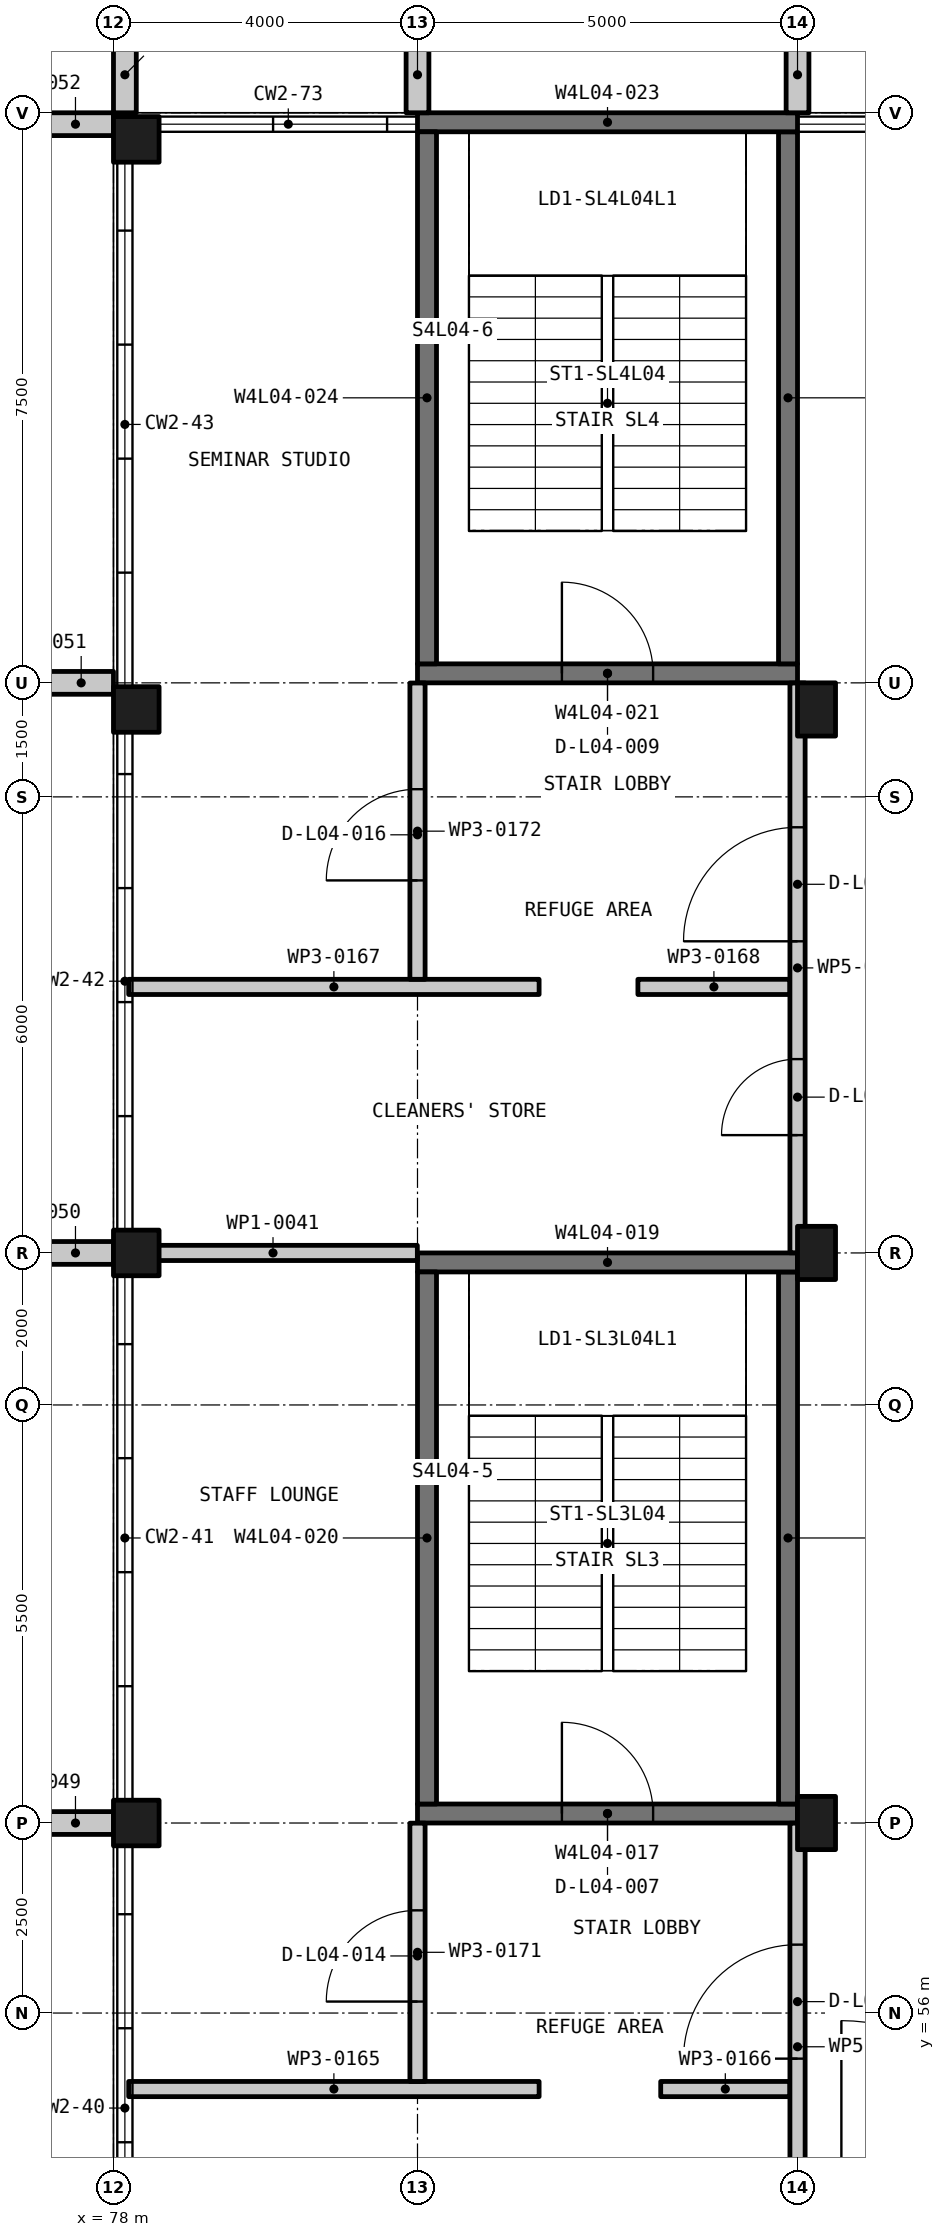
"""IFC4 building model, lengths in metres.
Left out: names, types, materials, properties, quantities, classifications, styles, units other than length and angle.
Written with IfcOpenShell. Run it as: python <this file> out.ifc"""

import sys

from ifc_helpers import new_model, si_unit, direction, frame, frame_2d, origin, origin_2d, place, context, subcontext, project, spatial, rectangle, extrude, element, fill, save


model = new_model("IFC4")
c1 = context("Model", 3, precision=1e-05, world=origin(), true_north=direction((0.0, 1.0)))
c2 = subcontext(c1, "Body", "Model", "MODEL_VIEW")
j1 = project(units=[si_unit("LENGTHUNIT", "METRE"), si_unit("PLANEANGLEUNIT", "RADIAN")], contexts=[c1])
p1 = place(None, origin())
s1 = spatial("IfcSite", under=j1, at=p1, CompositionType="ELEMENT")
p2 = place(p1, origin())
s2 = spatial("IfcBuilding", under=s1, at=p2, CompositionType="ELEMENT")
p3 = place(p2, frame((0.0, 0.0, 20.25)))
s3 = spatial("IfcBuildingStorey", under=s2, at=p3, CompositionType="ELEMENT", Elevation=20.25)
for number, where, z_axis, x_axis in (
    (1, (78.3, 58.5, -0.3), (0.0, 0.0, 1.0), (1.0, 0.0, 0.0)),
    (2, (78.3, 66.0, -0.3), (0.0, 0.0, 1.0), (1.0, 0.0, 0.0)),
    (3, (78.3, 73.15, -0.3), (0.0, 0.0, 1.0), (1.0, 0.0, 0.0)),
    (4, (78.3, 80.65, -0.3), (0.0, 0.0, 1.0), (1.0, 0.0, 0.0)),
):
    element("IfcColumn", number, at=place(p3, frame(where, z_axis=z_axis, x_axis=x_axis)), inside=s3, PredefinedType="COLUMN", context=c2, shape_type="SweptSolid", body=[
        extrude(rectangle(XDim=0.6, YDim=0.6, at=origin_2d()), origin(), (0.0, 0.0, 1.0), 4.5),
    ])
for number, where, z_axis, x_axis in (
    (5, (87.25, 58.5, -0.3), (0.0, 0.0, 1.0), (1.0, 0.0, 0.0)),
    (6, (87.25, 66.0, -0.3), (0.0, 0.0, 1.0), (1.0, 0.0, 0.0)),
    (7, (87.25, 73.15, -0.3), (0.0, 0.0, 1.0), (1.0, 0.0, 0.0)),
):
    element("IfcColumn", number, at=place(p3, frame(where, z_axis=z_axis, x_axis=x_axis)), inside=s3, PredefinedType="COLUMN", context=c2, shape_type="SweptSolid", body=[
        extrude(rectangle(XDim=0.5, YDim=0.7, at=origin_2d()), origin(), (0.0, 0.0, 1.0), 4.5),
    ])
p4 = place(p3, frame((82.0, 58.625, -0.3), z_axis=(0.0, 0.0, 1.0), x_axis=(1.0, 0.0, 0.0)))
e8 = element("IfcWall", 8, at=p4, inside=s3, PredefinedType="SHEAR", context=c2, shape_type="SweptSolid", body=[
    extrude(rectangle(XDim=5.0, YDim=0.25, at=frame_2d((2.5, 0.0))), origin(), (0.0, 0.0, 1.0), 4.5),
])
p5 = place(p4, frame((1.9, 0.0, 0.3)))
e9 = element("IfcOpeningElement", 9, at=p5, cuts=e8, PredefinedType="OPENING", context=c2, shape_type="SweptSolid", body=[
    extrude(rectangle(XDim=1.2, YDim=2.2, at=frame_2d((0.6, 1.1))), frame((0.0, 0.135, 0.0), z_axis=(0.0, -1.0, 0.0), x_axis=(1.0, 0.0, 0.0)), (0.0, 0.0, 1.0), 0.27),
])
p6 = place(p3, frame((86.875, 58.75, -0.3), z_axis=(0.0, 0.0, 1.0), x_axis=(0.0, 1.0, 0.0)))
e10 = element("IfcWall", 10, at=p6, inside=s3, PredefinedType="SHEAR", context=c2, shape_type="SweptSolid", body=[
    extrude(rectangle(XDim=7.0, YDim=0.25, at=frame_2d((3.5, 0.0))), origin(), (0.0, 0.0, 1.0), 4.5),
])
p7 = place(p3, frame((82.0, 65.875, -0.3), z_axis=(0.0, 0.0, 1.0), x_axis=(1.0, 0.0, 0.0)))
e11 = element("IfcWall", 11, at=p7, inside=s3, PredefinedType="SHEAR", context=c2, shape_type="SweptSolid", body=[
    extrude(rectangle(XDim=5.0, YDim=0.25, at=frame_2d((2.5, 0.0))), origin(), (0.0, 0.0, 1.0), 4.5),
])
p8 = place(p3, frame((82.125, 58.75, -0.3), z_axis=(0.0, 0.0, 1.0), x_axis=(0.0, 1.0, 0.0)))
e12 = element("IfcWall", 12, at=p8, inside=s3, PredefinedType="SHEAR", context=c2, shape_type="SweptSolid", body=[
    extrude(rectangle(XDim=7.0, YDim=0.25, at=frame_2d((3.5, 0.0))), origin(), (0.0, 0.0, 1.0), 4.5),
])
p9 = place(p3, frame((82.0, 73.625, -0.3), z_axis=(0.0, 0.0, 1.0), x_axis=(1.0, 0.0, 0.0)))
e13 = element("IfcWall", 13, at=p9, inside=s3, PredefinedType="SHEAR", context=c2, shape_type="SweptSolid", body=[
    extrude(rectangle(XDim=5.0, YDim=0.25, at=frame_2d((2.5, 0.0))), origin(), (0.0, 0.0, 1.0), 4.5),
])
p10 = place(p9, frame((1.9, 0.0, 0.3)))
e14 = element("IfcOpeningElement", 14, at=p10, cuts=e13, PredefinedType="OPENING", context=c2, shape_type="SweptSolid", body=[
    extrude(rectangle(XDim=1.2, YDim=2.2, at=frame_2d((0.6, 1.1))), frame((0.0, 0.135, 0.0), z_axis=(0.0, -1.0, 0.0), x_axis=(1.0, 0.0, 0.0)), (0.0, 0.0, 1.0), 0.27),
])
p11 = place(p3, frame((86.875, 73.75, -0.3), z_axis=(0.0, 0.0, 1.0), x_axis=(0.0, 1.0, 0.0)))
e15 = element("IfcWall", 15, at=p11, inside=s3, PredefinedType="SHEAR", context=c2, shape_type="SweptSolid", body=[
    extrude(rectangle(XDim=7.0, YDim=0.25, at=frame_2d((3.5, 0.0))), origin(), (0.0, 0.0, 1.0), 4.5),
])
p12 = place(p3, frame((82.0, 80.875, -0.3), z_axis=(0.0, 0.0, 1.0), x_axis=(1.0, 0.0, 0.0)))
e16 = element("IfcWall", 16, at=p12, inside=s3, PredefinedType="SHEAR", context=c2, shape_type="SweptSolid", body=[
    extrude(rectangle(XDim=5.0, YDim=0.25, at=frame_2d((2.5, 0.0))), origin(), (0.0, 0.0, 1.0), 4.5),
])
p13 = place(p3, frame((82.125, 73.75, -0.3), z_axis=(0.0, 0.0, 1.0), x_axis=(0.0, 1.0, 0.0)))
e17 = element("IfcWall", 17, at=p13, inside=s3, PredefinedType="SHEAR", context=c2, shape_type="SweptSolid", body=[
    extrude(rectangle(XDim=7.0, YDim=0.25, at=frame_2d((3.5, 0.0))), origin(), (0.0, 0.0, 1.0), 4.5),
])
for number, where, z_axis, x_axis in (
    (18, (77.0, 58.5, 0.0), (0.0, 0.0, 1.0), (1.0, 0.0, 0.0)),
    (19, (77.0, 66.0, 0.0), (0.0, 0.0, 1.0), (1.0, 0.0, 0.0)),
):
    element("IfcWall", number, at=place(p3, frame(where, z_axis=z_axis, x_axis=x_axis)), inside=s3, PredefinedType="SOLIDWALL", context=c2, shape_type="SweptSolid", body=[
        extrude(rectangle(XDim=1.0, YDim=0.3, at=frame_2d((0.5, 0.0))), origin(), (0.0, 0.0, 1.0), 4.5),
    ])
p14 = place(p3, frame((77.15, 73.5, 0.0), z_axis=(0.0, 0.0, 1.0), x_axis=(1.0, 0.0, 0.0)))
e20 = element("IfcWall", 20, at=p14, inside=s3, PredefinedType="SOLIDWALL", context=c2, shape_type="SweptSolid", body=[
    extrude(rectangle(XDim=0.85, YDim=0.3, at=frame_2d((0.425, 0.0))), origin(), (0.0, 0.0, 1.0), 4.5),
])
for number, where, z_axis, x_axis in (
    (21, (77.0, 80.85, 0.0), (0.0, 0.0, 1.0), (1.0, 0.0, 0.0)),
    (22, (78.15, 81.0, 0.0), (0.0, 0.0, 1.0), (0.0, 1.0, 0.0)),
    (23, (82.0, 81.0, 0.0), (0.0, 0.0, 1.0), (0.0, 1.0, 0.0)),
    (24, (87.0, 81.0, 0.0), (0.0, 0.0, 1.0), (0.0, 1.0, 0.0)),
):
    element("IfcWall", number, at=place(p3, frame(where, z_axis=z_axis, x_axis=x_axis)), inside=s3, PredefinedType="SOLIDWALL", context=c2, shape_type="SweptSolid", body=[
        extrude(rectangle(XDim=1.0, YDim=0.3, at=frame_2d((0.5, 0.0))), origin(), (0.0, 0.0, 1.0), 4.5),
    ])
p15 = place(p3, frame((78.2, 55.0, 0.0), z_axis=(0.0, 0.0, 1.0), x_axis=(1.0, 0.0, 0.0)))
e25 = element("IfcWall", 25, at=p15, inside=s3, PredefinedType="PARTITIONING", context=c2, shape_type="SweptSolid", body=[
    extrude(rectangle(XDim=5.4, YDim=0.2, at=frame_2d((2.7, 0.0))), origin(), (0.0, 0.0, 1.0), 3.4),
])
p16 = place(p3, frame((85.2, 55.0, 0.0), z_axis=(0.0, 0.0, 1.0), x_axis=(1.0, 0.0, 0.0)))
e26 = element("IfcWall", 26, at=p16, inside=s3, PredefinedType="PARTITIONING", context=c2, shape_type="SweptSolid", body=[
    extrude(rectangle(XDim=1.7, YDim=0.2, at=frame_2d((0.85, 0.0))), origin(), (0.0, 0.0, 1.0), 3.6),
])
p17 = place(p3, frame((78.2, 66.0, 0.0), z_axis=(0.0, 0.0, 1.0), x_axis=(1.0, 0.0, 0.0)))
e27 = element("IfcWall", 27, at=p17, inside=s3, PredefinedType="PARTITIONING", context=c2, shape_type="SweptSolid", body=[
    extrude(rectangle(XDim=3.798, YDim=0.2, at=frame_2d((1.899, 0.0))), origin(), (0.0, 0.0, 1.0), 3.4),
])
p18 = place(p3, frame((78.2, 69.5, 0.0), z_axis=(0.0, 0.0, 1.0), x_axis=(1.0, 0.0, 0.0)))
e28 = element("IfcWall", 28, at=p18, inside=s3, PredefinedType="PARTITIONING", context=c2, shape_type="SweptSolid", body=[
    extrude(rectangle(XDim=5.4, YDim=0.2, at=frame_2d((2.7, 0.0))), origin(), (0.0, 0.0, 1.0), 3.4),
])
p19 = place(p3, frame((84.9, 69.5, 0.0), z_axis=(0.0, 0.0, 1.0), x_axis=(1.0, 0.0, 0.0)))
e29 = element("IfcWall", 29, at=p19, inside=s3, PredefinedType="PARTITIONING", context=c2, shape_type="SweptSolid", body=[
    extrude(rectangle(XDim=2.0, YDim=0.2, at=frame_2d((1.0, 0.0))), origin(), (0.0, 0.0, 1.0), 3.6),
])
p20 = place(p3, frame((87.0, 52.615, 0.0), z_axis=(0.0, 0.0, 1.0), x_axis=(0.0, 1.0, 0.0)))
e30 = element("IfcWall", 30, at=p20, inside=s3, PredefinedType="PARTITIONING", context=c2, shape_type="SweptSolid", body=[
    extrude(rectangle(XDim=5.884, YDim=0.2, at=frame_2d((2.942, 0.0))), origin(), (0.0, 0.0, 1.0), 3.4),
])
p21 = place(p20, frame((2.785, 0.0, 0.0)))
e31 = element("IfcOpeningElement", 31, at=p21, cuts=e30, PredefinedType="OPENING", context=c2, shape_type="SweptSolid", body=[
    extrude(rectangle(XDim=1.5, YDim=2.1, at=frame_2d((0.75, 1.05))), frame((0.0, 0.11, 0.0), z_axis=(0.0, -1.0, 0.0), x_axis=(1.0, 0.0, 0.0)), (0.0, 0.0, 1.0), 0.22),
])
p22 = place(p3, frame((87.0, 66.002, 0.0), z_axis=(0.0, 0.0, 1.0), x_axis=(0.0, 1.0, 0.0)))
e32 = element("IfcWall", 32, at=p22, inside=s3, PredefinedType="PARTITIONING", context=c2, shape_type="SweptSolid", body=[
    extrude(rectangle(XDim=7.496, YDim=0.2, at=frame_2d((3.748, 0.0))), origin(), (0.0, 0.0, 1.0), 3.4),
])
p23 = place(p22, frame((4.098, 0.0, 0.0)))
e33 = element("IfcOpeningElement", 33, at=p23, cuts=e32, PredefinedType="OPENING", context=c2, shape_type="SweptSolid", body=[
    extrude(rectangle(XDim=1.5, YDim=2.1, at=frame_2d((0.75, 1.05))), frame((0.0, 0.11, 0.0), z_axis=(0.0, -1.0, 0.0), x_axis=(1.0, 0.0, 0.0)), (0.0, 0.0, 1.0), 0.22),
])
p24 = place(p22, frame((1.548, 0.0, 0.0)))
e34 = element("IfcOpeningElement", 34, at=p24, cuts=e32, PredefinedType="OPENING", context=c2, shape_type="SweptSolid", body=[
    extrude(rectangle(XDim=1.0, YDim=2.1, at=frame_2d((0.5, 1.05))), frame((0.0, 0.11, 0.0), z_axis=(0.0, -1.0, 0.0), x_axis=(1.0, 0.0, 0.0)), (0.0, 0.0, 1.0), 0.22),
])
p25 = place(p3, frame((82.0, 55.1, 0.0), z_axis=(0.0, 0.0, 1.0), x_axis=(0.0, 1.0, 0.0)))
e35 = element("IfcWall", 35, at=p25, inside=s3, PredefinedType="PARTITIONING", context=c2, shape_type="SweptSolid", body=[
    extrude(rectangle(XDim=3.398, YDim=0.2, at=frame_2d((1.699, 0.0))), origin(), (0.0, 0.0, 1.0), 3.4),
])
p26 = place(p25, frame((1.051, 0.0, 0.0)))
e36 = element("IfcOpeningElement", 36, at=p26, cuts=e35, PredefinedType="OPENING", context=c2, shape_type="SweptSolid", body=[
    extrude(rectangle(XDim=1.2, YDim=2.1, at=frame_2d((0.6, 1.05))), frame((0.0, 0.11, 0.0), z_axis=(0.0, -1.0, 0.0), x_axis=(1.0, 0.0, 0.0)), (0.0, 0.0, 1.0), 0.22),
])
p27 = place(p3, frame((82.0, 69.6, 0.0), z_axis=(0.0, 0.0, 1.0), x_axis=(0.0, 1.0, 0.0)))
e37 = element("IfcWall", 37, at=p27, inside=s3, PredefinedType="PARTITIONING", context=c2, shape_type="SweptSolid", body=[
    extrude(rectangle(XDim=3.898, YDim=0.2, at=frame_2d((1.949, 0.0))), origin(), (0.0, 0.0, 1.0), 3.4),
])
p28 = place(p27, frame((1.301, 0.0, 0.0)))
e38 = element("IfcOpeningElement", 38, at=p28, cuts=e37, PredefinedType="OPENING", context=c2, shape_type="SweptSolid", body=[
    extrude(rectangle(XDim=1.2, YDim=2.1, at=frame_2d((0.6, 1.05))), frame((0.0, 0.11, 0.0), z_axis=(0.0, -1.0, 0.0), x_axis=(1.0, 0.0, 0.0)), (0.0, 0.0, 1.0), 0.22),
])
p29 = place(p5, origin())
e39 = element("IfcDoor", 39, at=p29, inside=s3, OperationType="SINGLE_SWING_LEFT", PredefinedType="DOOR", context=c2, shape_type="SweptSolid", body=[
    extrude(rectangle(XDim=1.2, YDim=2.2, at=frame_2d((0.6, 1.1))), frame((0.0, 0.025, 0.0), z_axis=(0.0, -1.0, 0.0), x_axis=(1.0, 0.0, 0.0)), (0.0, 0.0, 1.0), 0.05),
])
fill(e9, e39)
p30 = place(p21, origin())
e40 = element("IfcDoor", 40, at=p30, inside=s3, OperationType="DOUBLE_DOOR_SINGLE_SWING", PredefinedType="DOOR", context=c2, shape_type="SweptSolid", body=[
    extrude(rectangle(XDim=1.5, YDim=2.1, at=frame_2d((0.75, 1.05))), frame((0.0, 0.025, 0.0), z_axis=(0.0, -1.0, 0.0), x_axis=(1.0, 0.0, 0.0)), (0.0, 0.0, 1.0), 0.05),
])
fill(e31, e40)
p31 = place(p10, origin())
e41 = element("IfcDoor", 41, at=p31, inside=s3, OperationType="SINGLE_SWING_LEFT", PredefinedType="DOOR", context=c2, shape_type="SweptSolid", body=[
    extrude(rectangle(XDim=1.2, YDim=2.2, at=frame_2d((0.6, 1.1))), frame((0.0, 0.025, 0.0), z_axis=(0.0, -1.0, 0.0), x_axis=(1.0, 0.0, 0.0)), (0.0, 0.0, 1.0), 0.05),
])
fill(e14, e41)
p32 = place(p23, origin())
e42 = element("IfcDoor", 42, at=p32, inside=s3, OperationType="DOUBLE_DOOR_SINGLE_SWING", PredefinedType="DOOR", context=c2, shape_type="SweptSolid", body=[
    extrude(rectangle(XDim=1.5, YDim=2.1, at=frame_2d((0.75, 1.05))), frame((0.0, 0.025, 0.0), z_axis=(0.0, -1.0, 0.0), x_axis=(1.0, 0.0, 0.0)), (0.0, 0.0, 1.0), 0.05),
])
fill(e33, e42)
p33 = place(p26, origin())
e43 = element("IfcDoor", 43, at=p33, inside=s3, OperationType="SINGLE_SWING_RIGHT", PredefinedType="DOOR", context=c2, shape_type="SweptSolid", body=[
    extrude(rectangle(XDim=1.2, YDim=2.1, at=frame_2d((0.6, 1.05))), frame((0.0, 0.025, 0.0), z_axis=(0.0, -1.0, 0.0), x_axis=(1.0, 0.0, 0.0)), (0.0, 0.0, 1.0), 0.05),
])
fill(e36, e43)
p34 = place(p24, origin())
e44 = element("IfcDoor", 44, at=p34, inside=s3, OperationType="SINGLE_SWING_RIGHT", PredefinedType="DOOR", context=c2, shape_type="SweptSolid", body=[
    extrude(rectangle(XDim=1.0, YDim=2.1, at=frame_2d((0.5, 1.05))), frame((0.0, 0.025, 0.0), z_axis=(0.0, -1.0, 0.0), x_axis=(1.0, 0.0, 0.0)), (0.0, 0.0, 1.0), 0.05),
])
fill(e34, e44)
p35 = place(p28, origin())
e45 = element("IfcDoor", 45, at=p35, inside=s3, OperationType="SINGLE_SWING_RIGHT", PredefinedType="DOOR", context=c2, shape_type="SweptSolid", body=[
    extrude(rectangle(XDim=1.2, YDim=2.1, at=frame_2d((0.6, 1.05))), frame((0.0, 0.025, 0.0), z_axis=(0.0, -1.0, 0.0), x_axis=(1.0, 0.0, 0.0)), (0.0, 0.0, 1.0), 0.05),
])
fill(e38, e45)
save(model, sys.argv[1])
